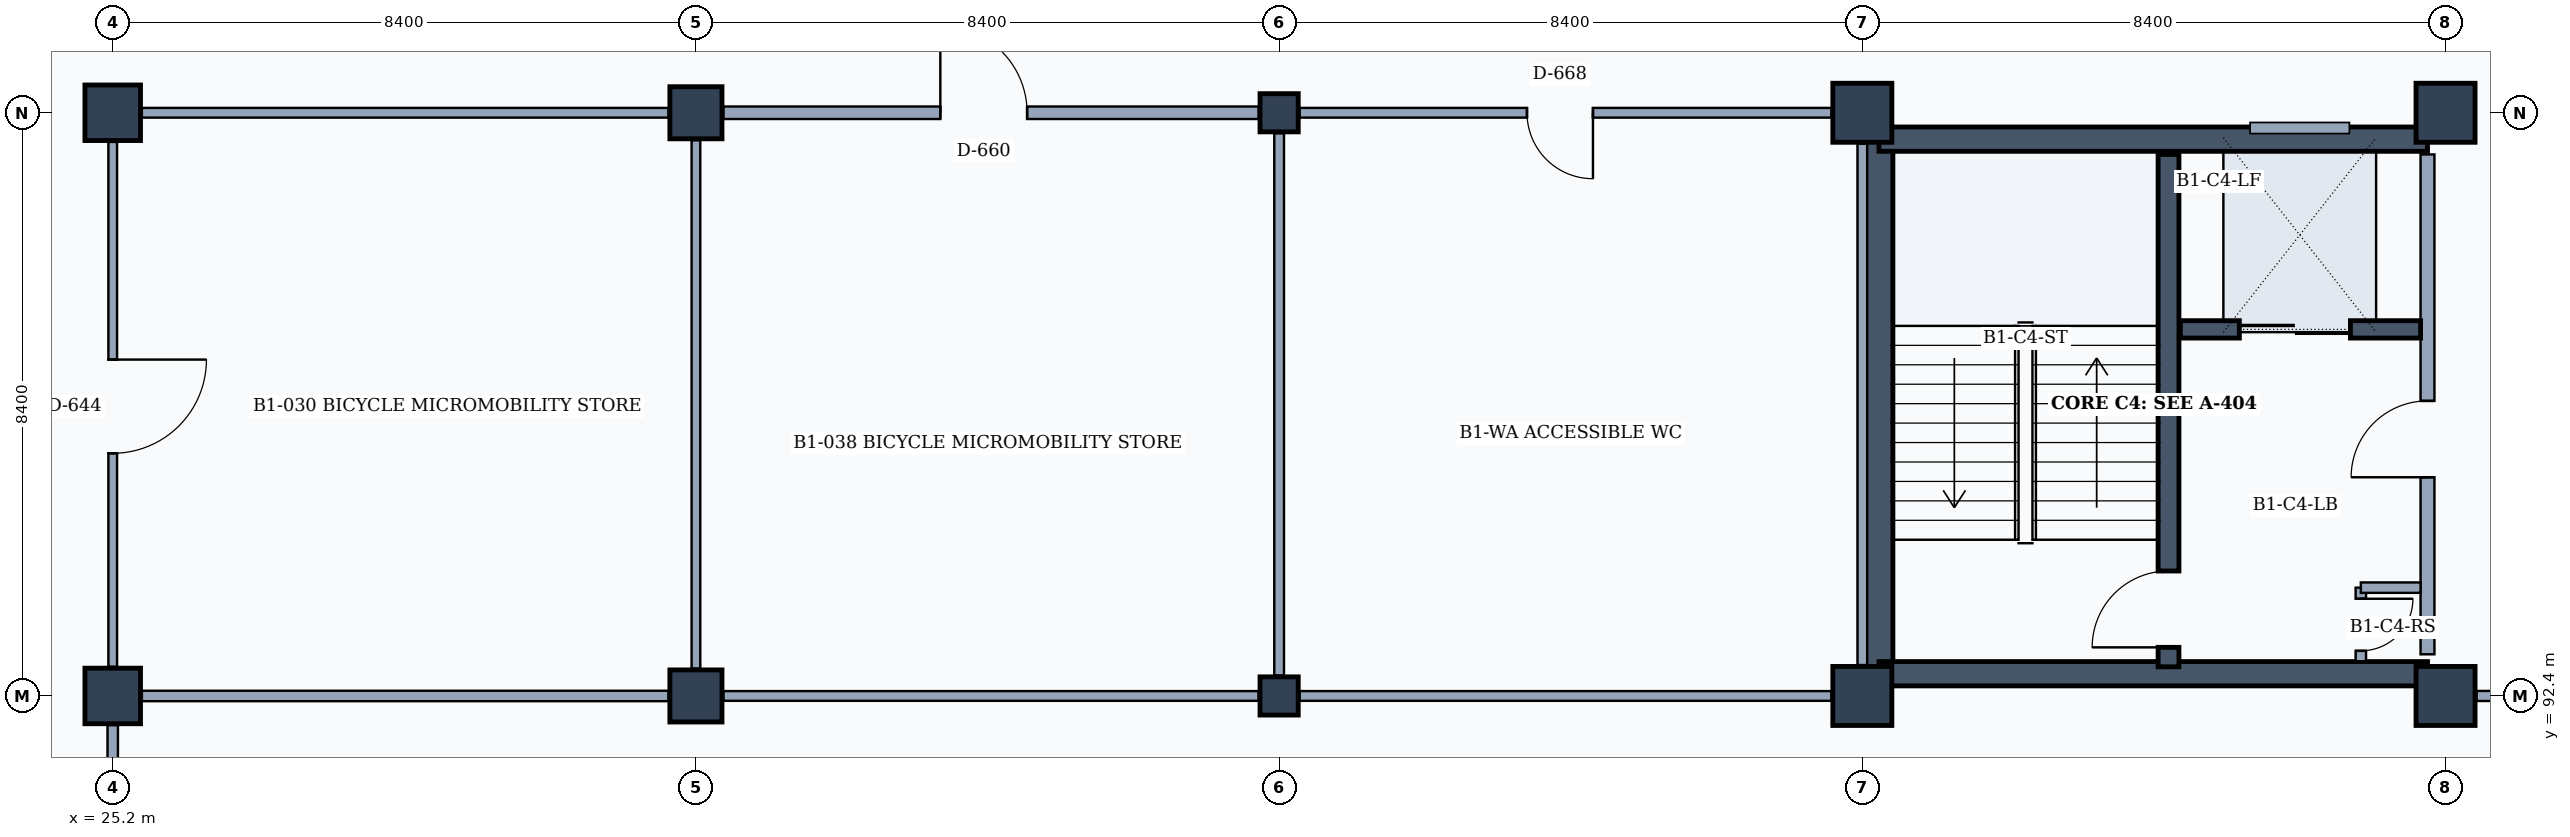
"""IFC4 building model, lengths in metres.
Left out: names, types, materials, properties, quantities, classifications, styles, units other than length and angle.
Written with IfcOpenShell. Run it as: python <this file> out.ifc"""

import sys

from ifc_helpers import new_model, si_unit, direction, frame, frame_2d, origin, origin_2d, place, context, subcontext, project, spatial, rectangle, extrude, element, fill, save


model = new_model("IFC4")
c1 = context("Model", 3, precision=1e-05, world=origin(), true_north=direction((0.0, 1.0)))
c2 = subcontext(c1, "Body", "Model", "MODEL_VIEW")
j1 = project(units=[si_unit("LENGTHUNIT", "METRE"), si_unit("PLANEANGLEUNIT", "RADIAN")], contexts=[c1])
p1 = place(None, origin())
s1 = spatial("IfcSite", under=j1, at=p1, CompositionType="ELEMENT")
p2 = place(p1, origin())
s2 = spatial("IfcBuilding", under=s1, at=p2, CompositionType="ELEMENT")
p3 = place(p2, frame((0.0, 0.0, -4.2)))
s3 = spatial("IfcBuildingStorey", under=s2, at=p3, CompositionType="ELEMENT", Elevation=-4.2)
for number, where, z_axis, x_axis in (
    (1, (25.2, 92.4, 0.0), (0.0, 0.0, 1.0), (1.0, 0.0, 0.0)),
    (2, (25.2, 100.8, 0.0), (0.0, 0.0, 1.0), (1.0, 0.0, 0.0)),
):
    element("IfcColumn", number, at=place(p3, frame(where, z_axis=z_axis, x_axis=x_axis)), inside=s3, PredefinedType="COLUMN", context=c2, shape_type="SweptSolid", body=[
        extrude(rectangle(XDim=0.8, YDim=0.8, at=origin_2d()), origin(), (0.0, 0.0, 1.0), 4.2),
    ])
for number, where, z_axis, x_axis in (
    (3, (33.6, 92.4, 0.0), (0.0, 0.0, 1.0), (1.0, 0.0, 0.0)),
    (4, (33.6, 100.8, 0.0), (0.0, 0.0, 1.0), (1.0, 0.0, 0.0)),
):
    element("IfcColumn", number, at=place(p3, frame(where, z_axis=z_axis, x_axis=x_axis)), inside=s3, PredefinedType="COLUMN", context=c2, shape_type="SweptSolid", body=[
        extrude(rectangle(XDim=0.75, YDim=0.75, at=origin_2d()), origin(), (0.0, 0.0, 1.0), 4.2),
    ])
for number, where, z_axis, x_axis in (
    (5, (42.0, 92.4, 0.0), (0.0, 0.0, 1.0), (1.0, 0.0, 0.0)),
    (6, (42.0, 100.8, 0.0), (0.0, 0.0, 1.0), (1.0, 0.0, 0.0)),
):
    element("IfcColumn", number, at=place(p3, frame(where, z_axis=z_axis, x_axis=x_axis)), inside=s3, PredefinedType="COLUMN", context=c2, shape_type="SweptSolid", body=[
        extrude(rectangle(XDim=0.55, YDim=0.55, at=origin_2d()), origin(), (0.0, 0.0, 1.0), 4.2),
    ])
for number, where, z_axis, x_axis in (
    (7, (50.4, 92.4, 0.0), (0.0, 0.0, 1.0), (1.0, 0.0, 0.0)),
    (8, (50.4, 100.8, 0.0), (0.0, 0.0, 1.0), (1.0, 0.0, 0.0)),
    (9, (58.8, 92.4, 0.0), (0.0, 0.0, 1.0), (1.0, 0.0, 0.0)),
    (10, (58.8, 100.8, 0.0), (0.0, 0.0, 1.0), (1.0, 0.0, 0.0)),
):
    element("IfcColumn", number, at=place(p3, frame(where, z_axis=z_axis, x_axis=x_axis)), inside=s3, PredefinedType="COLUMN", context=c2, shape_type="SweptSolid", body=[
        extrude(rectangle(XDim=0.85, YDim=0.85, at=origin_2d()), origin(), (0.0, 0.0, 1.0), 4.2),
    ])
p4 = place(p3, frame((50.64, 92.65, 0.0), z_axis=(0.0, 0.0, 1.0), x_axis=(0.0, 1.0, 0.0)))
e11 = element("IfcWall", 11, at=p4, inside=s3, PredefinedType="SHEAR", context=c2, shape_type="SweptSolid", body=[
    extrude(rectangle(XDim=7.94, YDim=0.4, at=frame_2d((3.97, 0.0))), origin(), (0.0, 0.0, 1.0), 3.88),
])
p5 = place(p3, frame((50.64, 100.42, 0.0), z_axis=(0.0, 0.0, 1.0), x_axis=(1.0, 0.0, 0.0)))
e12 = element("IfcWall", 12, at=p5, inside=s3, PredefinedType="SHEAR", context=c2, shape_type="SweptSolid", body=[
    extrude(rectangle(XDim=7.9, YDim=0.35, at=frame_2d((3.95, 0.0))), origin(), (0.0, 0.0, 1.0), 3.88),
])
p6 = place(p3, frame((58.54, 100.2, 0.0), z_axis=(0.0, 0.0, 1.0), x_axis=(0.0, -1.0, 0.0)))
e13 = element("IfcWall", 13, at=p6, inside=s3, PredefinedType="PARTITIONING", context=c2, shape_type="SweptSolid", body=[
    extrude(rectangle(XDim=7.2, YDim=0.2, at=frame_2d((3.6, 0.0))), origin(), (0.0, 0.0, 1.0), 3.23),
])
p7 = place(p6, frame((3.55, 0.0, 0.0)))
e14 = element("IfcOpeningElement", 14, at=p7, cuts=e13, PredefinedType="OPENING", context=c2, shape_type="SweptSolid", body=[
    extrude(rectangle(XDim=1.1, YDim=2.15, at=frame_2d((0.55, 1.075))), frame((0.0, 0.11, 0.0), z_axis=(0.0, -1.0, 0.0), x_axis=(1.0, 0.0, 0.0)), (0.0, 0.0, 1.0), 0.22),
])
p8 = place(p3, frame((58.54, 92.72, 0.0), z_axis=(0.0, 0.0, 1.0), x_axis=(-1.0, 0.0, 0.0)))
e15 = element("IfcWall", 15, at=p8, inside=s3, PredefinedType="SHEAR", context=c2, shape_type="SweptSolid", body=[
    extrude(rectangle(XDim=7.9, YDim=0.35, at=frame_2d((3.95, 0.0))), origin(), (0.0, 0.0, 1.0), 3.88),
])
p9 = place(p3, frame((54.81, 92.82, 0.0), z_axis=(0.0, 0.0, 1.0), x_axis=(0.0, 1.0, 0.0)))
e16 = element("IfcWall", 16, at=p9, inside=s3, PredefinedType="SHEAR", context=c2, shape_type="SweptSolid", body=[
    extrude(rectangle(XDim=7.38, YDim=0.3, at=frame_2d((3.69, 0.0))), origin(), (0.0, 0.0, 1.0), 3.88),
])
p10 = place(p9, frame((0.28, 0.0, 0.0)))
e17 = element("IfcOpeningElement", 17, at=p10, cuts=e16, PredefinedType="OPENING", context=c2, shape_type="SweptSolid", body=[
    extrude(rectangle(XDim=1.1, YDim=2.15, at=frame_2d((0.55, 1.075))), frame((0.0, 0.16, 0.0), z_axis=(0.0, -1.0, 0.0), x_axis=(1.0, 0.0, 0.0)), (0.0, 0.0, 1.0), 0.32),
])
p11 = place(p3, frame((57.58, 93.96, 0.0), z_axis=(0.0, 0.0, 1.0), x_axis=(0.0, -1.0, 0.0)))
e18 = element("IfcWall", 18, at=p11, inside=s3, PredefinedType="PARTITIONING", context=c2, shape_type="SweptSolid", body=[
    extrude(rectangle(XDim=1.06, YDim=0.15, at=frame_2d((0.53, 0.0))), origin(), (0.0, 0.0, 1.0), 3.32),
])
p12 = place(p11, frame((0.16, 0.0, 0.0)))
e19 = element("IfcOpeningElement", 19, at=p12, cuts=e18, PredefinedType="OPENING", context=c2, shape_type="SweptSolid", body=[
    extrude(rectangle(XDim=0.75, YDim=2.05, at=frame_2d((0.375, 1.025))), frame((0.0, 0.085, 0.0), z_axis=(0.0, -1.0, 0.0), x_axis=(1.0, 0.0, 0.0)), (0.0, 0.0, 1.0), 0.17),
])
p13 = place(p3, frame((57.58, 93.96, 0.0), z_axis=(0.0, 0.0, 1.0), x_axis=(1.0, 0.0, 0.0)))
e20 = element("IfcWall", 20, at=p13, inside=s3, PredefinedType="PARTITIONING", context=c2, shape_type="SweptSolid", body=[
    extrude(rectangle(XDim=0.86, YDim=0.15, at=frame_2d((0.43, 0.0))), origin(), (0.0, 0.0, 1.0), 3.32),
])
p14 = place(p3, frame((54.98, 97.68, 0.0), z_axis=(0.0, 0.0, 1.0), x_axis=(1.0, 0.0, 0.0)))
e21 = element("IfcWall", 21, at=p14, inside=s3, PredefinedType="SHEAR", context=c2, shape_type="SweptSolid", body=[
    extrude(rectangle(XDim=3.46, YDim=0.25, at=frame_2d((1.73, 0.0))), origin(), (0.0, 0.0, 1.0), 3.88),
])
p15 = place(p14, frame((0.85, 0.0, 0.0)))
e22 = element("IfcOpeningElement", 22, at=p15, cuts=e21, PredefinedType="OPENING", context=c2, shape_type="SweptSolid", body=[
    extrude(rectangle(XDim=1.6, YDim=2.3, at=frame_2d((0.8, 1.15))), frame((0.0, 0.135, 0.0), z_axis=(0.0, -1.0, 0.0), x_axis=(1.0, 0.0, 0.0)), (0.0, 0.0, 1.0), 0.27),
])
p16 = place(p3, frame((25.2, 84.42, 0.0), z_axis=(0.0, 0.0, 1.0), x_axis=(0.0, 1.0, 0.0)))
e23 = element("IfcWall", 23, at=p16, inside=s3, PredefinedType="PARTITIONING", context=c2, shape_type="SweptSolid", body=[
    extrude(rectangle(XDim=7.56, YDim=0.15, at=frame_2d((3.78, 0.0))), origin(), (0.0, 0.0, 1.0), 3.25),
])
p17 = place(p16, frame((3.125, 0.0, 0.0)))
e24 = element("IfcOpeningElement", 24, at=p17, cuts=e23, PredefinedType="OPENING", context=c2, shape_type="SweptSolid", body=[
    extrude(rectangle(XDim=1.25, YDim=2.3, at=frame_2d((0.625, 1.15))), frame((0.0, 0.085, 0.0), z_axis=(0.0, -1.0, 0.0), x_axis=(1.0, 0.0, 0.0)), (0.0, 0.0, 1.0), 0.17),
])
p18 = place(p3, frame((25.2, 92.82, 0.0), z_axis=(0.0, 0.0, 1.0), x_axis=(0.0, 1.0, 0.0)))
e25 = element("IfcWall", 25, at=p18, inside=s3, PredefinedType="PARTITIONING", context=c2, shape_type="SweptSolid", body=[
    extrude(rectangle(XDim=7.56, YDim=0.125, at=frame_2d((3.78, 0.0))), origin(), (0.0, 0.0, 1.0), 3.25),
])
p19 = place(p18, frame((3.075, 0.0, 0.0)))
e26 = element("IfcOpeningElement", 26, at=p19, cuts=e25, PredefinedType="OPENING", context=c2, shape_type="SweptSolid", body=[
    extrude(rectangle(XDim=1.35, YDim=2.25, at=frame_2d((0.675, 1.125))), frame((0.0, 0.073, 0.0), z_axis=(0.0, -1.0, 0.0), x_axis=(1.0, 0.0, 0.0)), (0.0, 0.0, 1.0), 0.145),
])
p20 = place(p3, frame((25.62, 92.4, 0.0), z_axis=(0.0, 0.0, 1.0), x_axis=(1.0, 0.0, 0.0)))
e27 = element("IfcWall", 27, at=p20, inside=s3, PredefinedType="PARTITIONING", context=c2, shape_type="SweptSolid", body=[
    extrude(rectangle(XDim=7.585, YDim=0.15, at=frame_2d((3.792, 0.0))), origin(), (0.0, 0.0, 1.0), 3.05),
])
p21 = place(p3, frame((33.6, 92.795, 0.0), z_axis=(0.0, 0.0, 1.0), x_axis=(0.0, 1.0, 0.0)))
e28 = element("IfcWall", 28, at=p21, inside=s3, PredefinedType="PARTITIONING", context=c2, shape_type="SweptSolid", body=[
    extrude(rectangle(XDim=7.61, YDim=0.125, at=frame_2d((3.805, 0.0))), origin(), (0.0, 0.0, 1.0), 3.25),
])
p22 = place(p3, frame((25.62, 100.8, 0.0), z_axis=(0.0, 0.0, 1.0), x_axis=(1.0, 0.0, 0.0)))
e29 = element("IfcWall", 29, at=p22, inside=s3, PredefinedType="PARTITIONING", context=c2, shape_type="SweptSolid", body=[
    extrude(rectangle(XDim=7.585, YDim=0.14, at=frame_2d((3.792, 0.0))), origin(), (0.0, 0.0, 1.0), 3.05),
])
p23 = place(p3, frame((33.995, 92.4, 0.0), z_axis=(0.0, 0.0, 1.0), x_axis=(1.0, 0.0, 0.0)))
e30 = element("IfcWall", 30, at=p23, inside=s3, PredefinedType="PARTITIONING", context=c2, shape_type="SweptSolid", body=[
    extrude(rectangle(XDim=7.71, YDim=0.14, at=frame_2d((3.855, 0.0))), origin(), (0.0, 0.0, 1.0), 3.05),
])
p24 = place(p3, frame((42.0, 92.695, 0.0), z_axis=(0.0, 0.0, 1.0), x_axis=(0.0, 1.0, 0.0)))
e31 = element("IfcWall", 31, at=p24, inside=s3, PredefinedType="PARTITIONING", context=c2, shape_type="SweptSolid", body=[
    extrude(rectangle(XDim=7.81, YDim=0.14, at=frame_2d((3.905, 0.0))), origin(), (0.0, 0.0, 1.0), 3.25),
])
p25 = place(p3, frame((33.995, 100.8, 0.0), z_axis=(0.0, 0.0, 1.0), x_axis=(1.0, 0.0, 0.0)))
e32 = element("IfcWall", 32, at=p25, inside=s3, PredefinedType="PARTITIONING", context=c2, shape_type="SweptSolid", body=[
    extrude(rectangle(XDim=7.71, YDim=0.18, at=frame_2d((3.855, 0.0))), origin(), (0.0, 0.0, 1.0), 3.05),
])
p26 = place(p25, frame((3.125, 0.0, 0.0)))
e33 = element("IfcOpeningElement", 33, at=p26, cuts=e32, PredefinedType="OPENING", context=c2, shape_type="SweptSolid", body=[
    extrude(rectangle(XDim=1.25, YDim=2.3, at=frame_2d((0.625, 1.15))), frame((0.0, 0.1, 0.0), z_axis=(0.0, -1.0, 0.0), x_axis=(1.0, 0.0, 0.0)), (0.0, 0.0, 1.0), 0.2),
])
p27 = place(p3, frame((42.295, 92.4, 0.0), z_axis=(0.0, 0.0, 1.0), x_axis=(1.0, 0.0, 0.0)))
e34 = element("IfcWall", 34, at=p27, inside=s3, PredefinedType="PARTITIONING", context=c2, shape_type="SweptSolid", body=[
    extrude(rectangle(XDim=7.66, YDim=0.14, at=frame_2d((3.83, 0.0))), origin(), (0.0, 0.0, 1.0), 3.03),
])
p28 = place(p3, frame((50.4, 92.845, 0.0), z_axis=(0.0, 0.0, 1.0), x_axis=(0.0, 1.0, 0.0)))
e35 = element("IfcWall", 35, at=p28, inside=s3, PredefinedType="PARTITIONING", context=c2, shape_type="SweptSolid", body=[
    extrude(rectangle(XDim=7.51, YDim=0.14, at=frame_2d((3.755, 0.0))), origin(), (0.0, 0.0, 1.0), 3.23),
])
p29 = place(p3, frame((42.295, 100.8, 0.0), z_axis=(0.0, 0.0, 1.0), x_axis=(1.0, 0.0, 0.0)))
e36 = element("IfcWall", 36, at=p29, inside=s3, PredefinedType="PARTITIONING", context=c2, shape_type="SweptSolid", body=[
    extrude(rectangle(XDim=7.66, YDim=0.14, at=frame_2d((3.83, 0.0))), origin(), (0.0, 0.0, 1.0), 3.03),
])
p30 = place(p29, frame((3.275, 0.0, 0.0)))
e37 = element("IfcOpeningElement", 37, at=p30, cuts=e36, PredefinedType="OPENING", context=c2, shape_type="SweptSolid", body=[
    extrude(rectangle(XDim=0.95, YDim=2.15, at=frame_2d((0.475, 1.075))), frame((0.0, 0.08, 0.0), z_axis=(0.0, -1.0, 0.0), x_axis=(1.0, 0.0, 0.0)), (0.0, 0.0, 1.0), 0.16),
])
p31 = place(p3, frame((59.245, 92.4, 0.0), z_axis=(0.0, 0.0, 1.0), x_axis=(1.0, 0.0, 0.0)))
e38 = element("IfcWall", 38, at=p31, inside=s3, PredefinedType="PARTITIONING", context=c2, shape_type="SweptSolid", body=[
    extrude(rectangle(XDim=7.61, YDim=0.145, at=frame_2d((3.805, 0.0))), origin(), (0.0, 0.0, 1.0), 2.93),
])
p32 = place(p31, frame((3.275, 0.0, 0.0)))
e39 = element("IfcOpeningElement", 39, at=p32, cuts=e38, PredefinedType="OPENING", context=c2, shape_type="SweptSolid", body=[
    extrude(rectangle(XDim=0.95, YDim=2.15, at=frame_2d((0.475, 1.075))), frame((0.0, 0.083, 0.0), z_axis=(0.0, -1.0, 0.0), x_axis=(1.0, 0.0, 0.0)), (0.0, 0.0, 1.0), 0.165),
])
p33 = place(p7, frame((1.1, 0.0, 0.0), z_axis=(0.0, 0.0, 1.0), x_axis=(-1.0, 0.0, 0.0)))
e40 = element("IfcDoor", 40, at=p33, inside=s3, OperationType="SINGLE_SWING_LEFT", PredefinedType="DOOR", context=c2, shape_type="SweptSolid", body=[
    extrude(rectangle(XDim=1.1, YDim=2.15, at=frame_2d((0.55, 1.075))), frame((0.0, 0.025, 0.0), z_axis=(0.0, -1.0, 0.0), x_axis=(1.0, 0.0, 0.0)), (0.0, 0.0, 1.0), 0.05),
])
fill(e14, e40)
p34 = place(p10, origin())
e41 = element("IfcDoor", 41, at=p34, inside=s3, OperationType="SINGLE_SWING_LEFT", PredefinedType="DOOR", context=c2, shape_type="SweptSolid", body=[
    extrude(rectangle(XDim=1.1, YDim=2.15, at=frame_2d((0.55, 1.075))), frame((0.0, 0.025, 0.0), z_axis=(0.0, -1.0, 0.0), x_axis=(1.0, 0.0, 0.0)), (0.0, 0.0, 1.0), 0.05),
])
fill(e17, e41)
p35 = place(p12, origin())
e42 = element("IfcDoor", 42, at=p35, inside=s3, OperationType="SINGLE_SWING_LEFT", PredefinedType="TRAPDOOR", context=c2, shape_type="SweptSolid", body=[
    extrude(rectangle(XDim=0.75, YDim=2.05, at=frame_2d((0.375, 1.025))), frame((0.0, 0.025, 0.0), z_axis=(0.0, -1.0, 0.0), x_axis=(1.0, 0.0, 0.0)), (0.0, 0.0, 1.0), 0.05),
])
fill(e19, e42)
p36 = place(p15, origin())
e43 = element("IfcDoor", 43, at=p36, inside=s3, OperationType="DOUBLE_DOOR_SLIDING", PredefinedType="DOOR", context=c2, shape_type="SweptSolid", body=[
    extrude(rectangle(XDim=1.6, YDim=2.3, at=frame_2d((0.8, 1.15))), frame((0.0, 0.025, 0.0), z_axis=(0.0, -1.0, 0.0), x_axis=(1.0, 0.0, 0.0)), (0.0, 0.0, 1.0), 0.05),
])
fill(e22, e43)
p37 = place(p19, frame((1.35, 0.0, 0.0), z_axis=(0.0, 0.0, 1.0), x_axis=(-1.0, 0.0, 0.0)))
e44 = element("IfcDoor", 44, at=p37, inside=s3, OperationType="SINGLE_SWING_LEFT", PredefinedType="DOOR", context=c2, shape_type="SweptSolid", body=[
    extrude(rectangle(XDim=1.35, YDim=2.25, at=frame_2d((0.675, 1.125))), frame((0.0, 0.025, 0.0), z_axis=(0.0, -1.0, 0.0), x_axis=(1.0, 0.0, 0.0)), (0.0, 0.0, 1.0), 0.05),
])
fill(e26, e44)
p38 = place(p26, origin())
e45 = element("IfcDoor", 45, at=p38, inside=s3, OperationType="SINGLE_SWING_LEFT", PredefinedType="DOOR", context=c2, shape_type="SweptSolid", body=[
    extrude(rectangle(XDim=1.25, YDim=2.3, at=frame_2d((0.625, 1.15))), frame((0.0, 0.025, 0.0), z_axis=(0.0, -1.0, 0.0), x_axis=(1.0, 0.0, 0.0)), (0.0, 0.0, 1.0), 0.05),
])
fill(e33, e45)
p39 = place(p30, frame((0.95, 0.0, 0.0), z_axis=(0.0, 0.0, 1.0), x_axis=(-1.0, 0.0, 0.0)))
e46 = element("IfcDoor", 46, at=p39, inside=s3, OperationType="SINGLE_SWING_LEFT", PredefinedType="DOOR", context=c2, shape_type="SweptSolid", body=[
    extrude(rectangle(XDim=0.95, YDim=2.15, at=frame_2d((0.475, 1.075))), frame((0.0, 0.025, 0.0), z_axis=(0.0, -1.0, 0.0), x_axis=(1.0, 0.0, 0.0)), (0.0, 0.0, 1.0), 0.05),
])
fill(e37, e46)
save(model, sys.argv[1])
